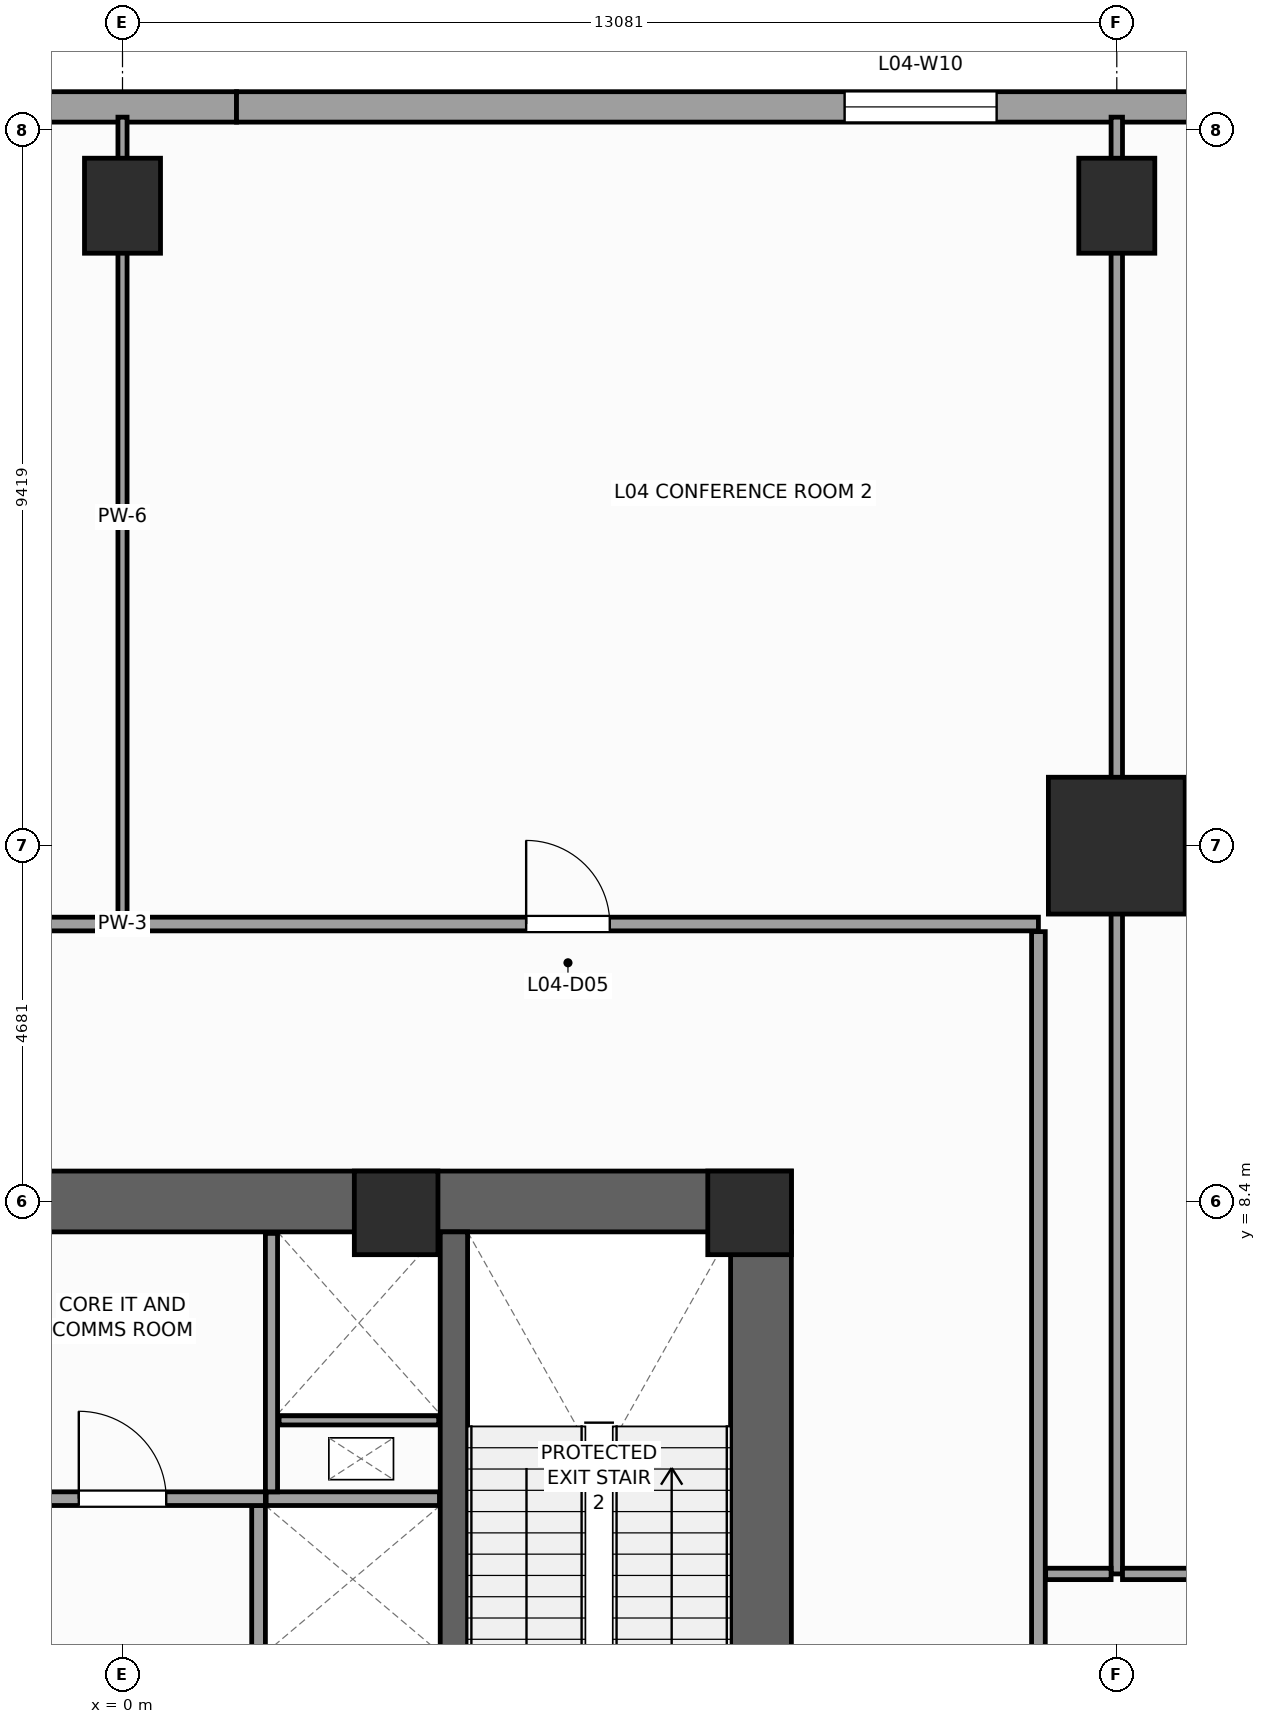
"""IFC4 building model, lengths in metres.
Left out: names, types, materials, properties, quantities, classifications, styles, units other than length and angle.
Written with IfcOpenShell. Run it as: python <this file> out.ifc"""

import sys

from ifc_helpers import new_model, si_unit, direction, frame, frame_2d, origin, origin_2d, place, context, subcontext, project, spatial, rectangle, extrude, source, transform, mapped, element, fill, save


model = new_model("IFC4")
c1 = context("Model", 3, precision=1e-05, world=origin(), true_north=direction((0.0, 1.0)))
c2 = subcontext(c1, "Body", "Model", "MODEL_VIEW")
j1 = project(units=[si_unit("LENGTHUNIT", "METRE"), si_unit("PLANEANGLEUNIT", "RADIAN")], contexts=[c1])
p1 = place(None, origin())
s1 = spatial("IfcSite", under=j1, at=p1, CompositionType="ELEMENT")
p2 = place(p1, origin())
s2 = spatial("IfcBuilding", under=s1, at=p2, CompositionType="ELEMENT")
p3 = place(p2, frame((0.0, 0.0, 21.0)))
s3 = spatial("IfcBuildingStorey", under=s2, at=p3, CompositionType="ELEMENT", Elevation=21.0)
p4 = place(p3, frame((-8.8, 8.4, 0.0), z_axis=(0.0, 0.0, 1.0), x_axis=(1.0, 0.0, 0.0)))
e1 = element("IfcWall", 1, at=p4, inside=s3, PredefinedType="SHEAR", context=c2, shape_type="SweptSolid", body=[
    extrude(rectangle(XDim=17.6, YDim=0.8, at=frame_2d((8.8, 0.0))), origin(), (0.0, 0.0, 1.0), 5.0),
])
p5 = place(p3, frame((8.4, -8.0, 0.0), z_axis=(0.0, 0.0, 1.0), x_axis=(0.0, 1.0, 0.0)))
e2 = element("IfcWall", 2, at=p5, inside=s3, PredefinedType="SHEAR", context=c2, shape_type="SweptSolid", body=[
    extrude(rectangle(XDim=16.0, YDim=0.8, at=frame_2d((8.0, 0.0))), origin(), (0.0, 0.0, 1.0), 5.0),
])
p6 = place(p5, frame((4.69, 0.0, 0.0)))
e3 = element("IfcOpeningElement", 3, at=p6, cuts=e2, PredefinedType="OPENING", context=c2, shape_type="SweptSolid", body=[
    extrude(rectangle(XDim=1.3, YDim=2.2, at=frame_2d((0.65, 1.1))), frame((0.0, 0.41, 0.0), z_axis=(0.0, -1.0, 0.0), x_axis=(1.0, 0.0, 0.0)), (0.0, 0.0, 1.0), 0.82),
])
p7 = place(p3, frame((4.36, -8.0, 0.0), z_axis=(0.0, 0.0, 1.0), x_axis=(0.0, 1.0, 0.0)))
e4 = element("IfcWall", 4, at=p7, inside=s3, PredefinedType="SHEAR", context=c2, shape_type="SweptSolid", body=[
    extrude(rectangle(XDim=16.0, YDim=0.36, at=frame_2d((8.0, 0.0))), origin(), (0.0, 0.0, 1.0), 5.0),
])
m1 = source(origin(), c2, "Body", "SweptSolid", [
    extrude(rectangle(XDim=1.1, YDim=1.1, at=origin_2d()), origin(), (0.0, 0.0, 1.0), 5.0),
])
for number, where, z_axis, x_axis in (
    (5, (8.25, 8.25, 0.0), (0.0, 0.0, 1.0), (1.0, 0.0, 0.0)),
    (6, (3.6, 8.25, 0.0), (0.0, 0.0, 1.0), (1.0, 0.0, 0.0)),
):
    element("IfcColumn", number, at=place(p3, frame(where, z_axis=z_axis, x_axis=x_axis)), inside=s3, PredefinedType="PILASTER", context=c2, shape_type="MappedRepresentation", body=[
        mapped(m1, transform((0.0, 0.0, 0.0), scale=1.0)),
    ])
m2 = source(origin(), c2, "Body", "SweptSolid", [
    extrude(rectangle(XDim=1.8, YDim=1.8, at=origin_2d()), origin(), (0.0, 0.0, 1.0), 5.0),
])
p8 = place(p3, frame((13.081, 13.081, 0.0), z_axis=(0.0, 0.0, 1.0), x_axis=(1.0, 0.0, 0.0)))
e7 = element("IfcColumn", 7, at=p8, inside=s3, PredefinedType="COLUMN", context=c2, shape_type="MappedRepresentation", body=[
    mapped(m2, transform((0.0, 0.0, 0.0), scale=1.0)),
])
m3 = source(origin(), c2, "Body", "SweptSolid", [
    extrude(rectangle(XDim=1.0, YDim=1.25, at=origin_2d()), origin(), (0.0, 0.0, 1.0), 5.0),
])
for number, where, z_axis, x_axis in (
    (8, (0.0, 21.5, 0.0), (0.0, 0.0, 1.0), (1.0, 0.0, 0.0)),
    (9, (13.081, 21.5, 0.0), (0.0, 0.0, 1.0), (1.0, 0.0, 0.0)),
):
    element("IfcColumn", number, at=place(p3, frame(where, z_axis=z_axis, x_axis=x_axis)), inside=s3, PredefinedType="COLUMN", context=c2, shape_type="MappedRepresentation", body=[
        mapped(m3, transform((0.0, 0.0, 0.0), scale=1.0)),
    ])
p9 = place(p3, frame((-31.0, 22.8, 0.0), z_axis=(0.0, 0.0, 1.0), x_axis=(1.0, 0.0, 0.0)))
e10 = element("IfcWall", 10, at=p9, inside=s3, PredefinedType="STANDARD", context=c2, shape_type="SweptSolid", body=[
    extrude(rectangle(XDim=32.5, YDim=0.4, at=frame_2d((16.25, 0.0))), origin(), (0.0, 0.0, 1.0), 4.72),
])
p10 = place(p9, frame((9.0, 0.0, 0.65)))
e11 = element("IfcOpeningElement", 11, at=p10, cuts=e10, PredefinedType="OPENING", context=c2, shape_type="SweptSolid", body=[
    extrude(rectangle(XDim=2.0, YDim=1.45, at=frame_2d((1.0, 0.725))), frame((0.0, 0.21, 0.0), z_axis=(0.0, -1.0, 0.0), x_axis=(1.0, 0.0, 0.0)), (0.0, 0.0, 1.0), 0.42),
])
p11 = place(p9, frame((14.0, 0.0, 0.65)))
e12 = element("IfcOpeningElement", 12, at=p11, cuts=e10, PredefinedType="OPENING", context=c2, shape_type="SweptSolid", body=[
    extrude(rectangle(XDim=2.0, YDim=1.45, at=frame_2d((1.0, 0.725))), frame((0.0, 0.21, 0.0), z_axis=(0.0, -1.0, 0.0), x_axis=(1.0, 0.0, 0.0)), (0.0, 0.0, 1.0), 0.42),
])
p12 = place(p9, frame((19.5, 0.0, 0.65)))
e13 = element("IfcOpeningElement", 13, at=p12, cuts=e10, PredefinedType="OPENING", context=c2, shape_type="SweptSolid", body=[
    extrude(rectangle(XDim=2.0, YDim=1.45, at=frame_2d((1.0, 0.725))), frame((0.0, 0.21, 0.0), z_axis=(0.0, -1.0, 0.0), x_axis=(1.0, 0.0, 0.0)), (0.0, 0.0, 1.0), 0.42),
])
p13 = place(p3, frame((1.5, 22.8, 0.0), z_axis=(0.0, 0.0, 1.0), x_axis=(1.0, 0.0, 0.0)))
e14 = element("IfcWall", 14, at=p13, inside=s3, PredefinedType="STANDARD", context=c2, shape_type="SweptSolid", body=[
    extrude(rectangle(XDim=29.5, YDim=0.4, at=frame_2d((14.75, 0.0))), origin(), (0.0, 0.0, 1.0), 4.72),
])
p14 = place(p13, frame((8.0, 0.0, 0.65)))
e15 = element("IfcOpeningElement", 15, at=p14, cuts=e14, PredefinedType="OPENING", context=c2, shape_type="SweptSolid", body=[
    extrude(rectangle(XDim=2.0, YDim=1.45, at=frame_2d((1.0, 0.725))), frame((0.0, 0.21, 0.0), z_axis=(0.0, -1.0, 0.0), x_axis=(1.0, 0.0, 0.0)), (0.0, 0.0, 1.0), 0.42),
])
p15 = place(p13, frame((13.5, 0.0, 0.65)))
e16 = element("IfcOpeningElement", 16, at=p15, cuts=e14, PredefinedType="OPENING", context=c2, shape_type="SweptSolid", body=[
    extrude(rectangle(XDim=2.0, YDim=1.45, at=frame_2d((1.0, 0.725))), frame((0.0, 0.21, 0.0), z_axis=(0.0, -1.0, 0.0), x_axis=(1.0, 0.0, 0.0)), (0.0, 0.0, 1.0), 0.42),
])
p16 = place(p13, frame((18.5, 0.0, 0.65)))
e17 = element("IfcOpeningElement", 17, at=p16, cuts=e14, PredefinedType="OPENING", context=c2, shape_type="SweptSolid", body=[
    extrude(rectangle(XDim=2.0, YDim=1.45, at=frame_2d((1.0, 0.725))), frame((0.0, 0.21, 0.0), z_axis=(0.0, -1.0, 0.0), x_axis=(1.0, 0.0, 0.0)), (0.0, 0.0, 1.0), 0.42),
])
p17 = place(p3, frame((1.79, -7.98, 0.0), z_axis=(0.0, 0.0, 1.0), x_axis=(0.0, 1.0, 0.0)))
e18 = element("IfcWall", 18, at=p17, inside=s3, PredefinedType="PARTITIONING", context=c2, shape_type="SweptSolid", body=[
    extrude(rectangle(XDim=12.38, YDim=0.18, at=frame_2d((6.19, 0.0))), origin(), (0.0, 0.0, 1.0), 4.72),
])
p18 = place(p17, frame((0.4, 0.0, 0.0)))
e19 = element("IfcOpeningElement", 19, at=p18, cuts=e18, PredefinedType="OPENING", context=c2, shape_type="SweptSolid", body=[
    extrude(rectangle(XDim=1.1, YDim=2.2, at=frame_2d((0.55, 1.1))), frame((0.0, 0.1, 0.0), z_axis=(0.0, -1.0, 0.0), x_axis=(1.0, 0.0, 0.0)), (0.0, 0.0, 1.0), 0.2),
])
p19 = place(p17, frame((2.46, 0.0, 0.0)))
e20 = element("IfcOpeningElement", 20, at=p19, cuts=e18, PredefinedType="OPENING", context=c2, shape_type="SweptSolid", body=[
    extrude(rectangle(XDim=1.1, YDim=2.2, at=frame_2d((0.55, 1.1))), frame((0.0, 0.1, 0.0), z_axis=(0.0, -1.0, 0.0), x_axis=(1.0, 0.0, 0.0)), (0.0, 0.0, 1.0), 0.2),
])
p20 = place(p3, frame((-1.88, 4.49, 0.0), z_axis=(0.0, 0.0, 1.0), x_axis=(1.0, 0.0, 0.0)))
e21 = element("IfcWall", 21, at=p20, inside=s3, PredefinedType="PARTITIONING", context=c2, shape_type="SweptSolid", body=[
    extrude(rectangle(XDim=3.76, YDim=0.18, at=frame_2d((1.88, 0.0))), origin(), (0.0, 0.0, 1.0), 4.72),
])
p21 = place(p20, frame((1.305, 0.0, 0.0)))
e22 = element("IfcOpeningElement", 22, at=p21, cuts=e21, PredefinedType="OPENING", context=c2, shape_type="SweptSolid", body=[
    extrude(rectangle(XDim=1.15, YDim=2.25, at=frame_2d((0.575, 1.125))), frame((0.0, 0.1, 0.0), z_axis=(0.0, -1.0, 0.0), x_axis=(1.0, 0.0, 0.0)), (0.0, 0.0, 1.0), 0.2),
])
p22 = place(p3, frame((1.89, 4.49, 0.0), z_axis=(0.0, 0.0, 1.0), x_axis=(1.0, 0.0, 0.0)))
e23 = element("IfcWall", 23, at=p22, inside=s3, PredefinedType="PARTITIONING", context=c2, shape_type="SweptSolid", body=[
    extrude(rectangle(XDim=2.28, YDim=0.18, at=frame_2d((1.14, 0.0))), origin(), (0.0, 0.0, 1.0), 4.72),
])
p23 = place(p3, frame((1.96, 4.58, 0.0), z_axis=(0.0, 0.0, 1.0), x_axis=(0.0, 1.0, 0.0)))
e24 = element("IfcWall", 24, at=p23, inside=s3, PredefinedType="PARTITIONING", context=c2, shape_type="SweptSolid", body=[
    extrude(rectangle(XDim=3.4, YDim=0.16, at=frame_2d((1.7, 0.0))), origin(), (0.0, 0.0, 1.0), 4.72),
])
p24 = place(p3, frame((2.06, 5.52, 0.0), z_axis=(0.0, 0.0, 1.0), x_axis=(1.0, 0.0, 0.0)))
e25 = element("IfcWall", 25, at=p24, inside=s3, PredefinedType="PARTITIONING", context=c2, shape_type="SweptSolid", body=[
    extrude(rectangle(XDim=2.1, YDim=0.12, at=frame_2d((1.05, 0.0))), origin(), (0.0, 0.0, 1.0), 4.72),
])
p25 = place(p3, frame((-12.05, 12.05, 0.0), z_axis=(0.0, 0.0, 1.0), x_axis=(1.0, 0.0, 0.0)))
e26 = element("IfcWall", 26, at=p25, inside=s3, PredefinedType="PARTITIONING", context=c2, shape_type="SweptSolid", body=[
    extrude(rectangle(XDim=24.1, YDim=0.18, at=frame_2d((12.05, 0.0))), origin(), (0.0, 0.0, 1.0), 4.72),
])
p26 = place(p25, frame((5.639, 0.0, 0.0)))
e27 = element("IfcOpeningElement", 27, at=p26, cuts=e26, PredefinedType="OPENING", context=c2, shape_type="SweptSolid", body=[
    extrude(rectangle(XDim=1.1, YDim=2.2, at=frame_2d((0.55, 1.1))), frame((0.0, 0.1, 0.0), z_axis=(0.0, -1.0, 0.0), x_axis=(1.0, 0.0, 0.0)), (0.0, 0.0, 1.0), 0.2),
])
p27 = place(p25, frame((17.361, 0.0, 0.0)))
e28 = element("IfcOpeningElement", 28, at=p27, cuts=e26, PredefinedType="OPENING", context=c2, shape_type="SweptSolid", body=[
    extrude(rectangle(XDim=1.1, YDim=2.2, at=frame_2d((0.55, 1.1))), frame((0.0, 0.1, 0.0), z_axis=(0.0, -1.0, 0.0), x_axis=(1.0, 0.0, 0.0)), (0.0, 0.0, 1.0), 0.2),
])
p28 = place(p3, frame((12.05, -4.96, 0.0), z_axis=(0.0, 0.0, 1.0), x_axis=(0.0, 1.0, 0.0)))
e29 = element("IfcWall", 29, at=p28, inside=s3, PredefinedType="PARTITIONING", context=c2, shape_type="SweptSolid", body=[
    extrude(rectangle(XDim=16.91, YDim=0.18, at=frame_2d((8.455, 0.0))), origin(), (0.0, 0.0, 1.0), 4.72),
])
p29 = place(p28, frame((5.835, 0.0, 0.0)))
e30 = element("IfcOpeningElement", 30, at=p29, cuts=e29, PredefinedType="OPENING", context=c2, shape_type="SweptSolid", body=[
    extrude(rectangle(XDim=0.95, YDim=2.15, at=frame_2d((0.475, 1.075))), frame((0.0, 0.1, 0.0), z_axis=(0.0, -1.0, 0.0), x_axis=(1.0, 0.0, 0.0)), (0.0, 0.0, 1.0), 0.2),
])
p30 = place(p3, frame((0.0, 12.145, 0.0), z_axis=(0.0, 0.0, 1.0), x_axis=(0.0, 1.0, 0.0)))
e31 = element("IfcWall", 31, at=p30, inside=s3, PredefinedType="PARTITIONING", context=c2, shape_type="SweptSolid", body=[
    extrude(rectangle(XDim=10.52, YDim=0.12, at=frame_2d((5.26, 0.0))), origin(), (0.0, 0.0, 1.0), 2.75),
])
p31 = place(p3, frame((13.081, 3.5, 0.0), z_axis=(0.0, 0.0, 1.0), x_axis=(0.0, 1.0, 0.0)))
e32 = element("IfcWall", 32, at=p31, inside=s3, PredefinedType="PARTITIONING", context=c2, shape_type="SweptSolid", body=[
    extrude(rectangle(XDim=19.165, YDim=0.15, at=frame_2d((9.583, 0.0))), origin(), (0.0, 0.0, 1.0), 2.88),
])
p32 = place(p3, frame((12.145, 3.5, 0.0), z_axis=(0.0, 0.0, 1.0), x_axis=(1.0, 0.0, 0.0)))
e33 = element("IfcWall", 33, at=p32, inside=s3, PredefinedType="PARTITIONING", context=c2, shape_type="SweptSolid", body=[
    extrude(rectangle(XDim=0.861, YDim=0.15, at=frame_2d((0.431, 0.0))), origin(), (0.0, 0.0, 1.0), 4.72),
])
p33 = place(p3, frame((13.156, 3.5, 0.0), z_axis=(0.0, 0.0, 1.0), x_axis=(1.0, 0.0, 0.0)))
e34 = element("IfcWall", 34, at=p33, inside=s3, PredefinedType="PARTITIONING", context=c2, shape_type="SweptSolid", body=[
    extrude(rectangle(XDim=5.804, YDim=0.15, at=frame_2d((2.902, 0.0))), origin(), (0.0, 0.0, 1.0), 4.72),
])
m4 = source(origin(), c2, "Body", "SweptSolid", [
    extrude(rectangle(XDim=2.0, YDim=1.45, at=frame_2d((1.0, 0.725))), frame((0.0, 0.03, 0.0), z_axis=(0.0, -1.0, 0.0), x_axis=(1.0, 0.0, 0.0)), (0.0, 0.0, 1.0), 0.06),
])
p34 = place(p14, origin())
e35 = element("IfcWindow", 35, at=p34, inside=s3, PartitioningType="SINGLE_PANEL", PredefinedType="WINDOW", context=c2, shape_type="MappedRepresentation", body=[
    mapped(m4, transform((0.0, 0.0, 0.0), scale=1.0)),
])
fill(e15, e35)
m5 = source(origin(), c2, "Body", "SweptSolid", [
    extrude(rectangle(XDim=1.15, YDim=2.25, at=frame_2d((0.575, 1.125))), frame((0.0, 0.025, 0.0), z_axis=(0.0, -1.0, 0.0), x_axis=(1.0, 0.0, 0.0)), (0.0, 0.0, 1.0), 0.05),
])
p35 = place(p21, origin())
e36 = element("IfcDoor", 36, at=p35, inside=s3, OperationType="SINGLE_SWING_LEFT", PredefinedType="DOOR", context=c2, shape_type="MappedRepresentation", body=[
    mapped(m5, transform((0.0, 0.0, 0.0), scale=1.0)),
])
fill(e22, e36)
m6 = source(origin(), c2, "Body", "SweptSolid", [
    extrude(rectangle(XDim=1.1, YDim=2.2, at=frame_2d((0.55, 1.1))), frame((0.0, 0.025, 0.0), z_axis=(0.0, -1.0, 0.0), x_axis=(1.0, 0.0, 0.0)), (0.0, 0.0, 1.0), 0.05),
])
p36 = place(p27, origin())
e37 = element("IfcDoor", 37, at=p36, inside=s3, OperationType="SINGLE_SWING_LEFT", PredefinedType="DOOR", context=c2, shape_type="MappedRepresentation", body=[
    mapped(m6, transform((0.0, 0.0, 0.0), scale=1.0)),
])
fill(e28, e37)
save(model, sys.argv[1])
